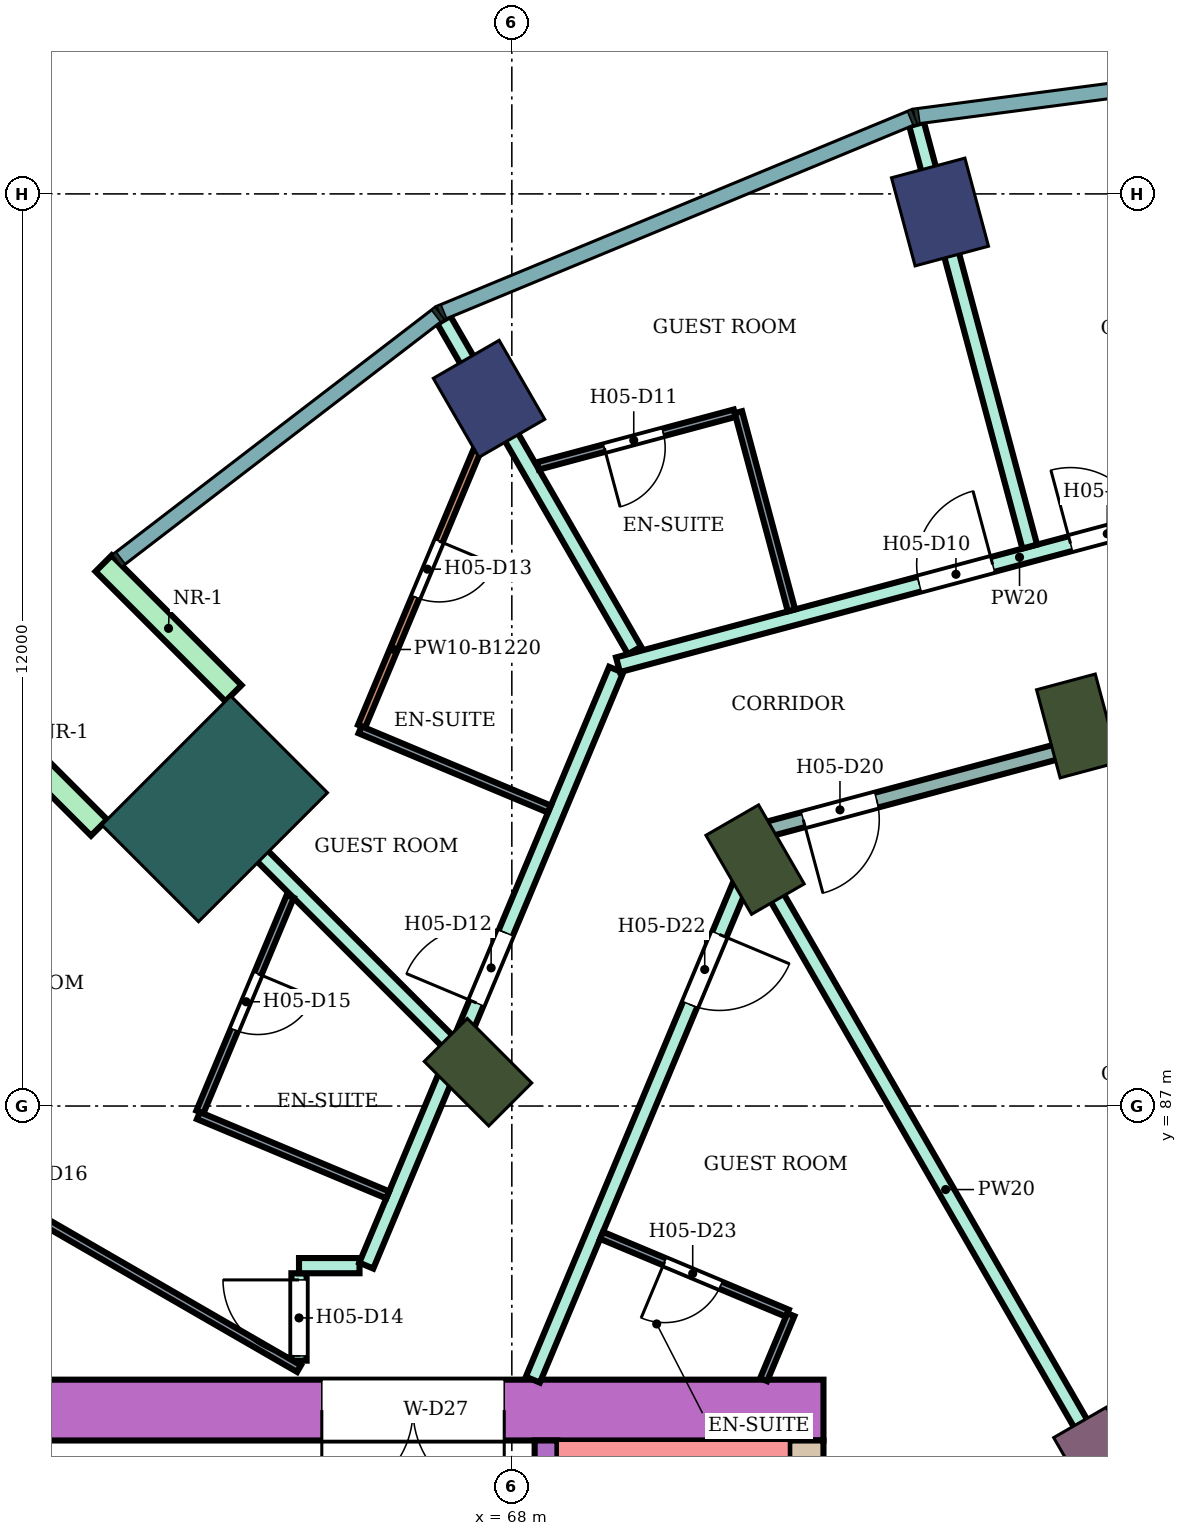
"""IFC4 building model, lengths in metres.
Left out: names, types, materials, properties, quantities, classifications, styles, units other than length and angle.
Written with IfcOpenShell. Run it as: python <this file> out.ifc"""

import sys

from ifc_helpers import new_model, si_unit, direction, frame, frame_2d, origin, origin_2d, place, context, subcontext, project, spatial, rectangle, extrude, element, fill, save


model = new_model("IFC4")
c1 = context("Model", 3, precision=1e-05, world=origin(), true_north=direction((0.0, 1.0)))
c2 = subcontext(c1, "Body", "Model", "MODEL_VIEW")
j1 = project(units=[si_unit("LENGTHUNIT", "METRE"), si_unit("PLANEANGLEUNIT", "RADIAN")], contexts=[c1])
p1 = place(None, origin())
s1 = spatial("IfcSite", under=j1, at=p1, CompositionType="ELEMENT")
p2 = place(p1, origin())
s2 = spatial("IfcBuilding", under=s1, at=p2, CompositionType="ELEMENT")
p3 = place(p2, frame((0.0, 0.0, 86.2)))
s3 = spatial("IfcBuildingStorey", under=s2, at=p3, CompositionType="ELEMENT", Elevation=86.2)
for number, where, z_axis, x_axis in (
    (1, (73.633, 98.762, 0.0), (0.0, 0.0, 1.0), (-0.259, 0.966, 0.0)),
    (2, (67.7, 96.304, 0.0), (0.0, 0.0, 1.0), (-0.5, 0.866, 0.0)),
):
    element("IfcColumn", number, at=place(p3, frame(where, z_axis=z_axis, x_axis=x_axis)), inside=s3, PredefinedType="COLUMN", context=c2, shape_type="SweptSolid", body=[
        extrude(rectangle(XDim=1.2, YDim=1.0, at=origin_2d()), origin(), (0.0, 0.0, 1.0), 3.8),
    ])
for number, where, z_axis, x_axis in (
    (3, (75.445, 92.0, 0.0), (0.0, 0.0, 1.0), (-0.259, 0.966, 0.0)),
    (4, (71.2, 90.242, 0.0), (0.0, 0.0, 1.0), (-0.5, 0.866, 0.0)),
    (5, (67.555, 87.445, 0.0), (0.0, 0.0, 1.0), (-0.707, 0.707, 0.0)),
):
    element("IfcColumn", number, at=place(p3, frame(where, z_axis=z_axis, x_axis=x_axis)), inside=s3, PredefinedType="COLUMN", context=c2, shape_type="SweptSolid", body=[
        extrude(rectangle(XDim=1.2, YDim=0.8, at=origin_2d()), origin(), (0.0, 0.0, 1.0), 3.8),
    ])
p4 = place(p3, frame((75.7, 82.448, 0.0), z_axis=(0.0, 0.0, 1.0), x_axis=(-0.5, 0.866025403784, 0.0)))
e6 = element("IfcColumn", 6, at=p4, inside=s3, PredefinedType="COLUMN", context=c2, shape_type="SweptSolid", body=[
    extrude(rectangle(XDim=0.9, YDim=0.8, at=origin_2d()), origin(), (0.0, 0.0, 1.0), 3.8),
])
p5 = place(p3, frame((64.09, 90.91, 0.0), z_axis=(0.0, 0.0, 1.0), x_axis=(-0.707106781187, 0.707106781187, 0.0)))
e7 = element("IfcColumn", 7, at=p5, inside=s3, PredefinedType="COLUMN", context=c2, shape_type="SweptSolid", body=[
    extrude(rectangle(XDim=1.8, YDim=2.4, at=origin_2d()), origin(), (0.0, 0.0, 1.0), 3.8),
])
p6 = place(p3, frame((72.1, 83.0, 0.0), z_axis=(0.0, 0.0, 1.0), x_axis=(-1.0, 0.0, 0.0)))
e8 = element("IfcWall", 8, at=p6, inside=s3, PredefinedType="SHEAR", context=c2, shape_type="SweptSolid", body=[
    extrude(rectangle(XDim=14.7, YDim=0.8, at=frame_2d((7.35, 0.0))), origin(), (0.0, 0.0, 1.0), 3.48),
])
p7 = place(p6, frame((4.2, 0.0, 0.0)))
e9 = element("IfcOpeningElement", 9, at=p7, cuts=e8, PredefinedType="OPENING", context=c2, shape_type="SweptSolid", body=[
    extrude(rectangle(XDim=2.4, YDim=2.4, at=frame_2d((1.2, 1.2))), frame((0.0, 0.41, 0.0), z_axis=(0.0, -1.0, 0.0), x_axis=(1.0, 0.0, 0.0)), (0.0, 0.0, 1.0), 0.82),
])
p8 = place(p3, frame((71.875, 82.6, 0.0), z_axis=(0.0, 0.0, 1.0), x_axis=(0.0, -1.0, 0.0)))
e10 = element("IfcWall", 10, at=p8, inside=s3, PredefinedType="SHEAR", context=c2, shape_type="SweptSolid", body=[
    extrude(rectangle(XDim=7.6, YDim=0.45, at=frame_2d((3.8, 0.0))), origin(), (0.0, 0.0, 1.0), 3.48),
])
p9 = place(p3, frame((68.45, 82.6, 0.0), z_axis=(0.0, 0.0, 1.0), x_axis=(0.0, -1.0, 0.0)))
e11 = element("IfcWall", 11, at=p9, inside=s3, PredefinedType="SHEAR", context=c2, shape_type="SweptSolid", body=[
    extrude(rectangle(XDim=7.6, YDim=0.3, at=frame_2d((3.8, 0.0))), origin(), (0.0, 0.0, 1.0), 3.48),
])
p10 = place(p9, frame((0.25, 0.0, 0.0)))
e12 = element("IfcOpeningElement", 12, at=p10, cuts=e11, PredefinedType="OPENING", context=c2, shape_type="SweptSolid", body=[
    extrude(rectangle(XDim=0.9, YDim=2.1, at=frame_2d((0.45, 1.05))), frame((0.0, 0.16, 0.0), z_axis=(0.0, -1.0, 0.0), x_axis=(1.0, 0.0, 0.0)), (0.0, 0.0, 1.0), 0.32),
])
for number, where, z_axis, x_axis in (
    (13, (64.338, 92.43, 0.0), (0.0, 0.0, 1.0), (-0.707, 0.707, 0.0)),
    (14, (62.57, 90.662, 0.0), (0.0, 0.0, 1.0), (-0.707, 0.707, 0.0)),
):
    element("IfcWall", number, at=place(p3, frame(where, z_axis=z_axis, x_axis=x_axis)), inside=s3, PredefinedType="NOTDEFINED", context=c2, shape_type="SweptSolid", body=[
        extrude(rectangle(XDim=2.416, YDim=0.3, at=frame_2d((1.208, 0.0))), origin(), (0.0, 0.0, 1.0), 3.8),
    ])
p11 = place(p3, frame((63.6, 91.409, 0.0), z_axis=(0.0, 0.0, 1.0), x_axis=(0.70693749829, -0.707276023566, 0.0)))
e15 = element("IfcWall", 15, at=p11, inside=s3, PredefinedType="PARTITIONING", context=c2, shape_type="SweptSolid", body=[
    extrude(rectangle(XDim=5.048, YDim=0.2, at=frame_2d((2.524, 0.0))), origin(), (0.0, 0.0, 1.0), 3.35),
])
p12 = place(p3, frame((65.2, 83.65, 0.0), z_axis=(0.0, 0.0, 1.0), x_axis=(0.0, 1.0, 0.0)))
e16 = element("IfcWall", 16, at=p12, inside=s3, PredefinedType="PARTITIONING", context=c2, shape_type="SweptSolid", body=[
    extrude(rectangle(XDim=1.15, YDim=0.2, at=frame_2d((0.575, 0.0))), origin(), (0.0, 0.0, 1.0), 3.35),
])
p13 = place(p12, frame((0.062, 0.0, 0.0)))
e17 = element("IfcOpeningElement", 17, at=p13, cuts=e16, PredefinedType="OPENING", context=c2, shape_type="SweptSolid", body=[
    extrude(rectangle(XDim=1.0, YDim=2.1, at=frame_2d((0.5, 1.05))), frame((0.0, 0.11, 0.0), z_axis=(0.0, -1.0, 0.0), x_axis=(1.0, 0.0, 0.0)), (0.0, 0.0, 1.0), 0.22),
])
p14 = place(p3, frame((65.2, 84.9, 0.0), z_axis=(0.0, 0.0, 1.0), x_axis=(1.0, 0.0, 0.0)))
e18 = element("IfcWall", 18, at=p14, inside=s3, PredefinedType="PARTITIONING", context=c2, shape_type="SweptSolid", body=[
    extrude(rectangle(XDim=0.796, YDim=0.2, at=frame_2d((0.398, 0.0))), origin(), (0.0, 0.0, 1.0), 3.35),
])
p15 = place(p3, frame((66.085, 84.9, 0.0), z_axis=(0.0, 0.0, 1.0), x_axis=(0.386676248006, 0.922215527536, 0.0)))
e19 = element("IfcWall", 19, at=p15, inside=s3, PredefinedType="PARTITIONING", context=c2, shape_type="SweptSolid", body=[
    extrude(rectangle(XDim=8.5, YDim=0.2, at=frame_2d((4.25, 0.0))), origin(), (0.0, 0.0, 1.0), 3.35),
])
p16 = place(p15, frame((3.748, 0.0, 0.0)))
e20 = element("IfcOpeningElement", 20, at=p16, cuts=e19, PredefinedType="OPENING", context=c2, shape_type="SweptSolid", body=[
    extrude(rectangle(XDim=1.0, YDim=2.1, at=frame_2d((0.5, 1.05))), frame((0.0, 0.11, 0.0), z_axis=(0.0, -1.0, 0.0), x_axis=(1.0, 0.0, 0.0)), (0.0, 0.0, 1.0), 0.22),
])
p17 = place(p3, frame((67.104, 97.343, 0.0), z_axis=(0.0, 0.0, 1.0), x_axis=(0.499799615385, -0.866141064989, 0.0)))
e21 = element("IfcWall", 21, at=p17, inside=s3, PredefinedType="PARTITIONING", context=c2, shape_type="SweptSolid", body=[
    extrude(rectangle(XDim=5.021, YDim=0.2, at=frame_2d((2.511, 0.0))), origin(), (0.0, 0.0, 1.0), 3.35),
])
p18 = place(p3, frame((68.277, 83.4, 0.0), z_axis=(0.0, 0.0, 1.0), x_axis=(0.386454861164, 0.922308321703, 0.0)))
e22 = element("IfcWall", 22, at=p18, inside=s3, PredefinedType="PARTITIONING", context=c2, shape_type="SweptSolid", body=[
    extrude(rectangle(XDim=7.762, YDim=0.2, at=frame_2d((3.881, 0.0))), origin(), (0.0, 0.0, 1.0), 3.35),
])
p19 = place(p18, frame((5.351, 0.0, 0.0)))
e23 = element("IfcOpeningElement", 23, at=p19, cuts=e22, PredefinedType="OPENING", context=c2, shape_type="SweptSolid", body=[
    extrude(rectangle(XDim=1.0, YDim=2.1, at=frame_2d((0.5, 1.05))), frame((0.0, 0.11, 0.0), z_axis=(0.0, -1.0, 0.0), x_axis=(1.0, 0.0, 0.0)), (0.0, 0.0, 1.0), 0.22),
])
p20 = place(p3, frame((69.397, 92.805, 0.0), z_axis=(0.0, 0.0, 1.0), x_axis=(0.96596468683, 0.258673972015, 0.0)))
e24 = element("IfcWall", 24, at=p20, inside=s3, PredefinedType="PARTITIONING", context=c2, shape_type="SweptSolid", body=[
    extrude(rectangle(XDim=10.937, YDim=0.2, at=frame_2d((5.469, 0.0))), origin(), (0.0, 0.0, 1.0), 3.35),
])
p21 = place(p20, frame((6.163, 0.0, 0.0)))
e25 = element("IfcOpeningElement", 25, at=p21, cuts=e24, PredefinedType="OPENING", context=c2, shape_type="SweptSolid", body=[
    extrude(rectangle(XDim=1.0, YDim=2.1, at=frame_2d((0.5, 1.05))), frame((0.0, 0.11, 0.0), z_axis=(0.0, -1.0, 0.0), x_axis=(1.0, 0.0, 0.0)), (0.0, 0.0, 1.0), 0.22),
])
p22 = place(p20, frame((4.103, 0.0, 0.0)))
e26 = element("IfcOpeningElement", 26, at=p22, cuts=e24, PredefinedType="OPENING", context=c2, shape_type="SweptSolid", body=[
    extrude(rectangle(XDim=1.0, YDim=2.1, at=frame_2d((0.5, 1.05))), frame((0.0, 0.11, 0.0), z_axis=(0.0, -1.0, 0.0), x_axis=(1.0, 0.0, 0.0)), (0.0, 0.0, 1.0), 0.22),
])
p23 = place(p3, frame((71.264, 90.135, 0.0), z_axis=(0.0, 0.0, 1.0), x_axis=(0.499791624077, -0.866145676259, 0.0)))
e27 = element("IfcWall", 27, at=p23, inside=s3, PredefinedType="PARTITIONING", context=c2, shape_type="SweptSolid", body=[
    extrude(rectangle(XDim=9.778, YDim=0.2, at=frame_2d((4.889, 0.0))), origin(), (0.0, 0.0, 1.0), 3.35),
])
p24 = place(p3, frame((71.303, 90.625, 0.0), z_axis=(0.0, 0.0, 1.0), x_axis=(0.965971868307, 0.258647152776, 0.0)))
e28 = element("IfcWall", 28, at=p24, inside=s3, PredefinedType="PARTITIONING", context=c2, shape_type="SweptSolid", body=[
    extrude(rectangle(XDim=8.874, YDim=0.2, at=frame_2d((4.437, 0.0))), origin(), (0.0, 0.0, 1.0), 2.98),
])
p25 = place(p24, frame((0.55, 0.0, 0.0)))
e29 = element("IfcOpeningElement", 29, at=p25, cuts=e28, PredefinedType="OPENING", context=c2, shape_type="SweptSolid", body=[
    extrude(rectangle(XDim=1.0, YDim=2.1, at=frame_2d((0.5, 1.05))), frame((0.0, 0.11, 0.0), z_axis=(0.0, -1.0, 0.0), x_axis=(1.0, 0.0, 0.0)), (0.0, 0.0, 1.0), 0.22),
])
p26 = place(p3, frame((73.325, 99.919, 0.0), z_axis=(0.0, 0.0, 1.0), x_axis=(0.25871346471, -0.965954110286, 0.0)))
e30 = element("IfcWall", 30, at=p26, inside=s3, PredefinedType="PARTITIONING", context=c2, shape_type="SweptSolid", body=[
    extrude(rectangle(XDim=5.754, YDim=0.2, at=frame_2d((2.877, 0.0))), origin(), (0.0, 0.0, 1.0), 3.35),
])
p27 = place(p3, frame((57.659, 87.899, 0.0), z_axis=(0.0, 0.0, 1.0), x_axis=(0.86602264145, -0.500004784474, 0.0)))
e31 = element("IfcWall", 31, at=p27, inside=s3, PredefinedType="PARTITIONING", context=c2, shape_type="SweptSolid", body=[
    extrude(rectangle(XDim=8.708, YDim=0.1, at=frame_2d((4.354, 0.0))), origin(), (0.0, 0.0, 1.0), 3.35),
])
p28 = place(p27, frame((3.929, 0.0, 0.0)))
e32 = element("IfcOpeningElement", 32, at=p28, cuts=e31, PredefinedType="OPENING", context=c2, shape_type="SweptSolid", body=[
    extrude(rectangle(XDim=0.9, YDim=2.1, at=frame_2d((0.45, 1.05))), frame((0.0, 0.06, 0.0), z_axis=(0.0, -1.0, 0.0), x_axis=(1.0, 0.0, 0.0)), (0.0, 0.0, 1.0), 0.12),
])
p29 = place(p3, frame((63.896, 86.92, 0.0), z_axis=(0.0, 0.0, 1.0), x_axis=(0.386485049699, 0.922295671875, 0.0)))
e33 = element("IfcWall", 33, at=p29, inside=s3, PredefinedType="PARTITIONING", context=c2, shape_type="SweptSolid", body=[
    extrude(rectangle(XDim=3.077, YDim=0.1, at=frame_2d((1.539, 0.0))), origin(), (0.0, 0.0, 1.0), 3.35),
])
p30 = place(p29, frame((1.174, 0.0, 0.0)))
e34 = element("IfcOpeningElement", 34, at=p30, cuts=e33, PredefinedType="OPENING", context=c2, shape_type="SweptSolid", body=[
    extrude(rectangle(XDim=0.8, YDim=2.1, at=frame_2d((0.4, 1.05))), frame((0.0, 0.06, 0.0), z_axis=(0.0, -1.0, 0.0), x_axis=(1.0, 0.0, 0.0)), (0.0, 0.0, 1.0), 0.12),
])
p31 = place(p3, frame((63.877, 86.874, 0.0), z_axis=(0.0, 0.0, 1.0), x_axis=(0.922350337209, -0.386354572188, 0.0)))
e35 = element("IfcWall", 35, at=p31, inside=s3, PredefinedType="PARTITIONING", context=c2, shape_type="SweptSolid", body=[
    extrude(rectangle(XDim=2.7, YDim=0.1, at=frame_2d((1.35, 0.0))), origin(), (0.0, 0.0, 1.0), 3.35),
])
p32 = place(p3, frame((66.023, 91.996, 0.0), z_axis=(0.0, 0.0, 1.0), x_axis=(0.386497426192, 0.922290485447, 0.0)))
e36 = element("IfcWall", 36, at=p32, inside=s3, PredefinedType="PARTITIONING", context=c2, shape_type="SweptSolid", body=[
    extrude(rectangle(XDim=4.383, YDim=0.1, at=frame_2d((2.191, 0.0))), origin(), (0.0, 0.0, 1.0), 2.58),
])
p33 = place(p32, frame((1.841, 0.0, 0.0)))
e37 = element("IfcOpeningElement", 37, at=p33, cuts=e36, PredefinedType="OPENING", context=c2, shape_type="SweptSolid", body=[
    extrude(rectangle(XDim=0.8, YDim=2.1, at=frame_2d((0.4, 1.05))), frame((0.0, 0.06, 0.0), z_axis=(0.0, -1.0, 0.0), x_axis=(1.0, 0.0, 0.0)), (0.0, 0.0, 1.0), 0.12),
])
p34 = place(p3, frame((66.003, 91.95, 0.0), z_axis=(0.0, 0.0, 1.0), x_axis=(0.922350337209, -0.386354572188, 0.0)))
e38 = element("IfcWall", 38, at=p34, inside=s3, PredefinedType="PARTITIONING", context=c2, shape_type="SweptSolid", body=[
    extrude(rectangle(XDim=2.7, YDim=0.1, at=frame_2d((1.35, 0.0))), origin(), (0.0, 0.0, 1.0), 3.35),
])
p35 = place(p3, frame((68.343, 95.421, 0.0), z_axis=(0.0, 0.0, 1.0), x_axis=(0.965922846648, 0.258830165017, 0.0)))
e39 = element("IfcWall", 39, at=p35, inside=s3, PredefinedType="PARTITIONING", context=c2, shape_type="SweptSolid", body=[
    extrude(rectangle(XDim=2.681, YDim=0.1, at=frame_2d((1.34, 0.0))), origin(), (0.0, 0.0, 1.0), 3.35),
])
p36 = place(p35, frame((0.905, 0.0, 0.0)))
e40 = element("IfcOpeningElement", 40, at=p36, cuts=e39, PredefinedType="OPENING", context=c2, shape_type="SweptSolid", body=[
    extrude(rectangle(XDim=0.8, YDim=2.1, at=frame_2d((0.4, 1.05))), frame((0.0, 0.06, 0.0), z_axis=(0.0, -1.0, 0.0), x_axis=(1.0, 0.0, 0.0)), (0.0, 0.0, 1.0), 0.12),
])
p37 = place(p3, frame((69.181, 85.298, 0.0), z_axis=(0.0, 0.0, 1.0), x_axis=(0.922377635784, -0.38628939541, 0.0)))
e41 = element("IfcWall", 41, at=p37, inside=s3, PredefinedType="PARTITIONING", context=c2, shape_type="SweptSolid", body=[
    extrude(rectangle(XDim=2.65, YDim=0.1, at=frame_2d((1.325, 0.0))), origin(), (0.0, 0.0, 1.0), 3.35),
])
p38 = place(p37, frame((0.9, 0.0, 0.0)))
e42 = element("IfcOpeningElement", 42, at=p38, cuts=e41, PredefinedType="OPENING", context=c2, shape_type="SweptSolid", body=[
    extrude(rectangle(XDim=0.8, YDim=2.1, at=frame_2d((0.4, 1.05))), frame((0.0, 0.06, 0.0), z_axis=(0.0, -1.0, 0.0), x_axis=(1.0, 0.0, 0.0)), (0.0, 0.0, 1.0), 0.12),
])
p39 = place(p3, frame((70.981, 96.128, 0.0), z_axis=(0.0, 0.0, 1.0), x_axis=(0.25867580527, -0.965964195904, 0.0)))
e43 = element("IfcWall", 43, at=p39, inside=s3, PredefinedType="PARTITIONING", context=c2, shape_type="SweptSolid", body=[
    extrude(rectangle(XDim=2.699, YDim=0.1, at=frame_2d((1.35, 0.0))), origin(), (0.0, 0.0, 1.0), 3.35),
])
p40 = place(p3, frame((71.313, 83.4, 0.0), z_axis=(0.0, 0.0, 1.0), x_axis=(0.386148512695, 0.922436624459, 0.0)))
e44 = element("IfcWall", 44, at=p40, inside=s3, PredefinedType="PARTITIONING", context=c2, shape_type="SweptSolid", body=[
    extrude(rectangle(XDim=0.927, YDim=0.1, at=frame_2d((0.463, 0.0))), origin(), (0.0, 0.0, 1.0), 3.35),
])
p41 = place(p21, origin())
e45 = element("IfcDoor", 45, at=p41, inside=s3, OperationType="SINGLE_SWING_LEFT", PredefinedType="DOOR", context=c2, shape_type="SweptSolid", body=[
    extrude(rectangle(XDim=1.0, YDim=2.1, at=frame_2d((0.5, 1.05))), frame((0.0, 0.025, 0.0), z_axis=(0.0, -1.0, 0.0), x_axis=(1.0, 0.0, 0.0)), (0.0, 0.0, 1.0), 0.05),
])
fill(e25, e45)
p42 = place(p22, origin())
e46 = element("IfcDoor", 46, at=p42, inside=s3, OperationType="SINGLE_SWING_RIGHT", PredefinedType="DOOR", context=c2, shape_type="SweptSolid", body=[
    extrude(rectangle(XDim=1.0, YDim=2.1, at=frame_2d((0.5, 1.05))), frame((0.0, 0.025, 0.0), z_axis=(0.0, -1.0, 0.0), x_axis=(1.0, 0.0, 0.0)), (0.0, 0.0, 1.0), 0.05),
])
fill(e26, e46)
p43 = place(p36, frame((0.8, 0.0, 0.0), z_axis=(0.0, 0.0, 1.0), x_axis=(-1.0, 0.0, 0.0)))
e47 = element("IfcDoor", 47, at=p43, inside=s3, OperationType="SINGLE_SWING_RIGHT", PredefinedType="DOOR", context=c2, shape_type="SweptSolid", body=[
    extrude(rectangle(XDim=0.8, YDim=2.1, at=frame_2d((0.4, 1.05))), frame((0.0, 0.025, 0.0), z_axis=(0.0, -1.0, 0.0), x_axis=(1.0, 0.0, 0.0)), (0.0, 0.0, 1.0), 0.05),
])
fill(e40, e47)
p44 = place(p16, origin())
e48 = element("IfcDoor", 48, at=p44, inside=s3, OperationType="SINGLE_SWING_LEFT", PredefinedType="DOOR", context=c2, shape_type="SweptSolid", body=[
    extrude(rectangle(XDim=1.0, YDim=2.1, at=frame_2d((0.5, 1.05))), frame((0.0, 0.025, 0.0), z_axis=(0.0, -1.0, 0.0), x_axis=(1.0, 0.0, 0.0)), (0.0, 0.0, 1.0), 0.05),
])
fill(e20, e48)
p45 = place(p33, frame((0.8, 0.0, 0.0), z_axis=(0.0, 0.0, 1.0), x_axis=(-1.0, 0.0, 0.0)))
e49 = element("IfcDoor", 49, at=p45, inside=s3, OperationType="SINGLE_SWING_LEFT", PredefinedType="DOOR", context=c2, shape_type="SweptSolid", body=[
    extrude(rectangle(XDim=0.8, YDim=2.1, at=frame_2d((0.4, 1.05))), frame((0.0, 0.025, 0.0), z_axis=(0.0, -1.0, 0.0), x_axis=(1.0, 0.0, 0.0)), (0.0, 0.0, 1.0), 0.05),
])
fill(e37, e49)
p46 = place(p13, origin())
e50 = element("IfcDoor", 50, at=p46, inside=s3, OperationType="SINGLE_SWING_RIGHT", PredefinedType="DOOR", context=c2, shape_type="SweptSolid", body=[
    extrude(rectangle(XDim=1.0, YDim=2.1, at=frame_2d((0.5, 1.05))), frame((0.0, 0.025, 0.0), z_axis=(0.0, -1.0, 0.0), x_axis=(1.0, 0.0, 0.0)), (0.0, 0.0, 1.0), 0.05),
])
fill(e17, e50)
p47 = place(p30, frame((0.8, 0.0, 0.0), z_axis=(0.0, 0.0, 1.0), x_axis=(-1.0, 0.0, 0.0)))
e51 = element("IfcDoor", 51, at=p47, inside=s3, OperationType="SINGLE_SWING_LEFT", PredefinedType="DOOR", context=c2, shape_type="SweptSolid", body=[
    extrude(rectangle(XDim=0.8, YDim=2.1, at=frame_2d((0.4, 1.05))), frame((0.0, 0.025, 0.0), z_axis=(0.0, -1.0, 0.0), x_axis=(1.0, 0.0, 0.0)), (0.0, 0.0, 1.0), 0.05),
])
fill(e34, e51)
p48 = place(p25, frame((1.0, 0.0, 0.0), z_axis=(0.0, 0.0, 1.0), x_axis=(-1.0, 0.0, 0.0)))
e52 = element("IfcDoor", 52, at=p48, inside=s3, OperationType="SINGLE_SWING_RIGHT", PredefinedType="DOOR", context=c2, shape_type="SweptSolid", body=[
    extrude(rectangle(XDim=1.0, YDim=2.1, at=frame_2d((0.5, 1.05))), frame((0.0, 0.025, 0.0), z_axis=(0.0, -1.0, 0.0), x_axis=(1.0, 0.0, 0.0)), (0.0, 0.0, 1.0), 0.05),
])
fill(e29, e52)
p49 = place(p19, frame((1.0, 0.0, 0.0), z_axis=(0.0, 0.0, 1.0), x_axis=(-1.0, 0.0, 0.0)))
e53 = element("IfcDoor", 53, at=p49, inside=s3, OperationType="SINGLE_SWING_LEFT", PredefinedType="DOOR", context=c2, shape_type="SweptSolid", body=[
    extrude(rectangle(XDim=1.0, YDim=2.1, at=frame_2d((0.5, 1.05))), frame((0.0, 0.025, 0.0), z_axis=(0.0, -1.0, 0.0), x_axis=(1.0, 0.0, 0.0)), (0.0, 0.0, 1.0), 0.05),
])
fill(e23, e53)
p50 = place(p38, frame((0.8, 0.0, 0.0), z_axis=(0.0, 0.0, 1.0), x_axis=(-1.0, 0.0, 0.0)))
e54 = element("IfcDoor", 54, at=p50, inside=s3, OperationType="SINGLE_SWING_RIGHT", PredefinedType="DOOR", context=c2, shape_type="SweptSolid", body=[
    extrude(rectangle(XDim=0.8, YDim=2.1, at=frame_2d((0.4, 1.05))), frame((0.0, 0.025, 0.0), z_axis=(0.0, -1.0, 0.0), x_axis=(1.0, 0.0, 0.0)), (0.0, 0.0, 1.0), 0.05),
])
fill(e42, e54)
p51 = place(p7, origin())
e55 = element("IfcDoor", 55, at=p51, inside=s3, OperationType="DOUBLE_DOOR_SINGLE_SWING", PredefinedType="DOOR", context=c2, shape_type="SweptSolid", body=[
    extrude(rectangle(XDim=2.4, YDim=2.4, at=frame_2d((1.2, 1.2))), frame((0.0, 0.025, 0.0), z_axis=(0.0, -1.0, 0.0), x_axis=(1.0, 0.0, 0.0)), (0.0, 0.0, 1.0), 0.05),
])
fill(e9, e55)
save(model, sys.argv[1])
